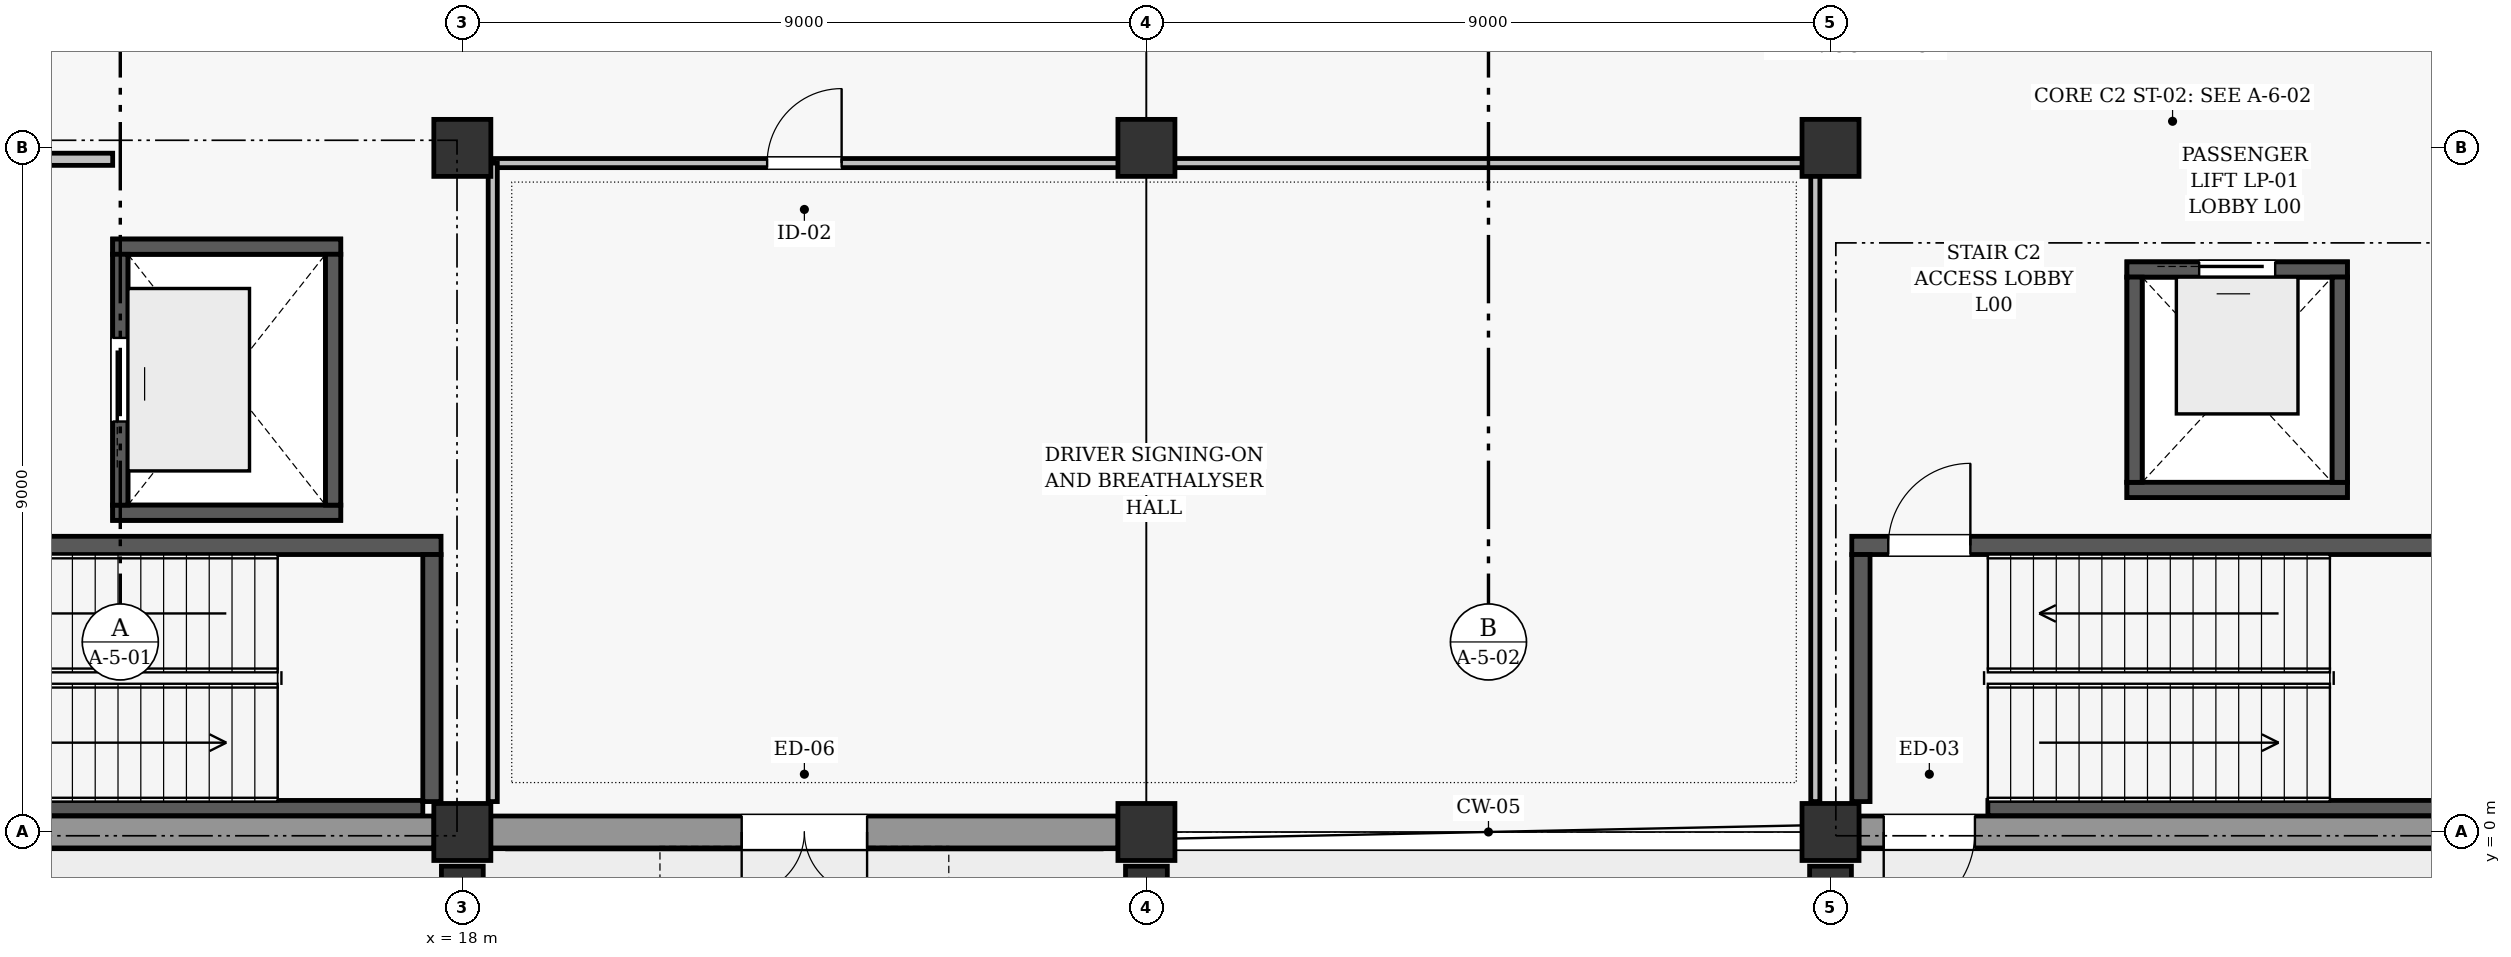
"""IFC4 building model, lengths in metres.
Left out: names, types, materials, properties, quantities, classifications, styles, units other than length and angle.
Written with IfcOpenShell. Run it as: python <this file> out.ifc"""

import sys

from ifc_helpers import new_model, si_unit, direction, frame, frame_2d, origin, origin_2d, place, context, subcontext, project, spatial, rectangle, extrude, element, fill, save


model = new_model("IFC4")
c1 = context("Model", 3, precision=1e-05, world=origin(), true_north=direction((0.0, 1.0)))
c2 = subcontext(c1, "Body", "Model", "MODEL_VIEW")
j1 = project(units=[si_unit("LENGTHUNIT", "METRE"), si_unit("PLANEANGLEUNIT", "RADIAN")], contexts=[c1])
p1 = place(None, origin())
s1 = spatial("IfcSite", under=j1, at=p1, CompositionType="ELEMENT")
p2 = place(p1, origin())
s2 = spatial("IfcBuilding", under=s1, at=p2, CompositionType="ELEMENT")
p3 = place(p2, origin())
s3 = spatial("IfcBuildingStorey", under=s2, at=p3, CompositionType="ELEMENT", Elevation=0.0)
for number, where, z_axis, x_axis in (
    (1, (18.0, 0.0, 0.0), (0.0, 0.0, 1.0), (1.0, 0.0, 0.0)),
    (2, (18.0, 9.0, 0.0), (0.0, 0.0, 1.0), (1.0, 0.0, 0.0)),
    (3, (27.0, 0.0, 0.0), (0.0, 0.0, 1.0), (1.0, 0.0, 0.0)),
    (4, (27.0, 9.0, 0.0), (0.0, 0.0, 1.0), (1.0, 0.0, 0.0)),
    (5, (36.0, 0.0, 0.0), (0.0, 0.0, 1.0), (1.0, 0.0, 0.0)),
    (6, (36.0, 9.0, 0.0), (0.0, 0.0, 1.0), (1.0, 0.0, 0.0)),
):
    element("IfcColumn", number, at=place(p3, frame(where, z_axis=z_axis, x_axis=x_axis)), inside=s3, PredefinedType="COLUMN", context=c2, shape_type="SweptSolid", body=[
        extrude(rectangle(XDim=0.75, YDim=0.75, at=origin_2d()), origin(), (0.0, 0.0, 1.0), 4.8),
    ])
for number, where, z_axis, x_axis in (
    (7, (18.0, -0.85, 0.0), (0.0, 0.0, 1.0), (1.0, 0.0, 0.0)),
    (8, (27.0, -0.85, 0.0), (0.0, 0.0, 1.0), (1.0, 0.0, 0.0)),
    (9, (36.0, -0.85, 0.0), (0.0, 0.0, 1.0), (1.0, 0.0, 0.0)),
):
    element("IfcColumn", number, at=place(p3, frame(where, z_axis=z_axis, x_axis=x_axis)), inside=s3, PredefinedType="PILASTER", context=c2, shape_type="SweptSolid", body=[
        extrude(rectangle(XDim=0.55, YDim=0.8, at=origin_2d()), origin(), (0.0, 0.0, 1.0), 4.8),
    ])
p4 = place(p3, frame((9.373, 0.0, 0.0), z_axis=(0.0, 0.0, 1.0), x_axis=(1.0, 0.0, 0.0)))
e10 = element("IfcWall", 10, at=p4, inside=s3, PredefinedType="SOLIDWALL", context=c2, shape_type="SweptSolid", body=[
    extrude(rectangle(XDim=8.254, YDim=0.42, at=frame_2d((4.127, 0.0))), origin(), (0.0, 0.0, 1.0), 3.842),
])
p5 = place(p4, frame((0.327, 0.0, 0.0)))
e11 = element("IfcOpeningElement", 11, at=p5, cuts=e10, PredefinedType="OPENING", context=c2, shape_type="SweptSolid", body=[
    extrude(rectangle(XDim=1.2, YDim=2.18, at=frame_2d((0.6, 1.09))), frame((0.0, 0.22, 0.0), z_axis=(0.0, -1.0, 0.0), x_axis=(1.0, 0.0, 0.0)), (0.0, 0.0, 1.0), 0.44),
])
p6 = place(p3, frame((18.373, 0.0, 0.0), z_axis=(0.0, 0.0, 1.0), x_axis=(1.0, 0.0, 0.0)))
e12 = element("IfcWall", 12, at=p6, inside=s3, PredefinedType="SOLIDWALL", context=c2, shape_type="SweptSolid", body=[
    extrude(rectangle(XDim=8.254, YDim=0.42, at=frame_2d((4.127, 0.0))), origin(), (0.0, 0.0, 1.0), 3.842),
])
p7 = place(p6, frame((3.302, 0.0, 0.0)))
e13 = element("IfcOpeningElement", 13, at=p7, cuts=e12, PredefinedType="OPENING", context=c2, shape_type="SweptSolid", body=[
    extrude(rectangle(XDim=1.65, YDim=2.28, at=frame_2d((0.825, 1.14))), frame((0.0, 0.22, 0.0), z_axis=(0.0, -1.0, 0.0), x_axis=(1.0, 0.0, 0.0)), (0.0, 0.0, 1.0), 0.44),
])
p8 = place(p3, frame((36.373, 0.0, 0.0), z_axis=(0.0, 0.0, 1.0), x_axis=(1.0, 0.0, 0.0)))
e14 = element("IfcWall", 14, at=p8, inside=s3, PredefinedType="SOLIDWALL", context=c2, shape_type="SweptSolid", body=[
    extrude(rectangle(XDim=8.254, YDim=0.42, at=frame_2d((4.127, 0.0))), origin(), (0.0, 0.0, 1.0), 3.842),
])
p9 = place(p8, frame((0.327, 0.0, 0.0)))
e15 = element("IfcOpeningElement", 15, at=p9, cuts=e14, PredefinedType="OPENING", context=c2, shape_type="SweptSolid", body=[
    extrude(rectangle(XDim=1.2, YDim=2.18, at=frame_2d((0.6, 1.09))), frame((0.0, 0.22, 0.0), z_axis=(0.0, -1.0, 0.0), x_axis=(1.0, 0.0, 0.0)), (0.0, 0.0, 1.0), 0.44),
])
p10 = place(p3, frame((11.07, 0.315, 0.0), z_axis=(0.0, 0.0, 1.0), x_axis=(1.0, 0.0, 0.0)))
e16 = element("IfcWall", 16, at=p10, inside=s3, PredefinedType="SHEAR", context=c2, shape_type="SweptSolid", body=[
    extrude(rectangle(XDim=6.41, YDim=0.2, at=frame_2d((3.205, 0.0))), origin(), (0.0, 0.0, 1.0), 4.55),
])
p11 = place(p3, frame((9.28, 3.77, 0.0), z_axis=(0.0, 0.0, 1.0), x_axis=(1.0, 0.0, 0.0)))
e17 = element("IfcWall", 17, at=p11, inside=s3, PredefinedType="SHEAR", context=c2, shape_type="SweptSolid", body=[
    extrude(rectangle(XDim=8.44, YDim=0.24, at=frame_2d((4.22, 0.0))), origin(), (0.0, 0.0, 1.0), 4.55),
])
p12 = place(p11, frame((0.48, 0.0, 0.0)))
e18 = element("IfcOpeningElement", 18, at=p12, cuts=e17, PredefinedType="OPENING", context=c2, shape_type="SweptSolid", body=[
    extrude(rectangle(XDim=1.08, YDim=2.08, at=frame_2d((0.54, 1.04))), frame((0.0, 0.13, 0.0), z_axis=(0.0, -1.0, 0.0), x_axis=(1.0, 0.0, 0.0)), (0.0, 0.0, 1.0), 0.26),
])
p13 = place(p3, frame((17.6, 0.4, 0.0), z_axis=(0.0, 0.0, 1.0), x_axis=(0.0, 1.0, 0.0)))
e19 = element("IfcWall", 19, at=p13, inside=s3, PredefinedType="SHEAR", context=c2, shape_type="SweptSolid", body=[
    extrude(rectangle(XDim=3.25, YDim=0.24, at=frame_2d((1.625, 0.0))), origin(), (0.0, 0.0, 1.0), 4.55),
])
p14 = place(p3, frame((38.07, 0.315, 0.0), z_axis=(0.0, 0.0, 1.0), x_axis=(1.0, 0.0, 0.0)))
e20 = element("IfcWall", 20, at=p14, inside=s3, PredefinedType="SHEAR", context=c2, shape_type="SweptSolid", body=[
    extrude(rectangle(XDim=6.41, YDim=0.2, at=frame_2d((3.205, 0.0))), origin(), (0.0, 0.0, 1.0), 4.55),
])
p15 = place(p3, frame((36.28, 3.77, 0.0), z_axis=(0.0, 0.0, 1.0), x_axis=(1.0, 0.0, 0.0)))
e21 = element("IfcWall", 21, at=p15, inside=s3, PredefinedType="SHEAR", context=c2, shape_type="SweptSolid", body=[
    extrude(rectangle(XDim=8.44, YDim=0.24, at=frame_2d((4.22, 0.0))), origin(), (0.0, 0.0, 1.0), 4.55),
])
p16 = place(p15, frame((0.48, 0.0, 0.0)))
e22 = element("IfcOpeningElement", 22, at=p16, cuts=e21, PredefinedType="OPENING", context=c2, shape_type="SweptSolid", body=[
    extrude(rectangle(XDim=1.08, YDim=2.08, at=frame_2d((0.54, 1.04))), frame((0.0, 0.13, 0.0), z_axis=(0.0, -1.0, 0.0), x_axis=(1.0, 0.0, 0.0)), (0.0, 0.0, 1.0), 0.26),
])
p17 = place(p3, frame((36.4, 0.4, 0.0), z_axis=(0.0, 0.0, 1.0), x_axis=(0.0, 1.0, 0.0)))
e23 = element("IfcWall", 23, at=p17, inside=s3, PredefinedType="SHEAR", context=c2, shape_type="SweptSolid", body=[
    extrude(rectangle(XDim=3.25, YDim=0.24, at=frame_2d((1.625, 0.0))), origin(), (0.0, 0.0, 1.0), 4.55),
])
for number, where, z_axis, x_axis in (
    (24, (13.4, 4.2, -1.4), (0.0, 0.0, 1.0), (1.0, 0.0, 0.0)),
    (25, (13.4, 7.7, -1.4), (0.0, 0.0, 1.0), (1.0, 0.0, 0.0)),
):
    element("IfcWall", number, at=place(p3, frame(where, z_axis=z_axis, x_axis=x_axis)), inside=s3, PredefinedType="SHEAR", context=c2, shape_type="SweptSolid", body=[
        extrude(rectangle(XDim=3.0, YDim=0.2, at=frame_2d((1.5, 0.0))), origin(), (0.0, 0.0, 1.0), 1.1),
    ])
for number, where, z_axis, x_axis in (
    (26, (13.5, 4.3, -1.4), (0.0, 0.0, 1.0), (0.0, 1.0, 0.0)),
    (27, (16.3, 4.3, -1.4), (0.0, 0.0, 1.0), (0.0, 1.0, 0.0)),
):
    element("IfcWall", number, at=place(p3, frame(where, z_axis=z_axis, x_axis=x_axis)), inside=s3, PredefinedType="SHEAR", context=c2, shape_type="SweptSolid", body=[
        extrude(rectangle(XDim=3.3, YDim=0.2, at=frame_2d((1.65, 0.0))), origin(), (0.0, 0.0, 1.0), 1.1),
    ])
for number, where, z_axis, x_axis in (
    (28, (13.4, 4.2, 0.0), (0.0, 0.0, 1.0), (1.0, 0.0, 0.0)),
    (29, (13.4, 7.7, 0.0), (0.0, 0.0, 1.0), (1.0, 0.0, 0.0)),
):
    element("IfcWall", number, at=place(p3, frame(where, z_axis=z_axis, x_axis=x_axis)), inside=s3, PredefinedType="SHEAR", context=c2, shape_type="SweptSolid", body=[
        extrude(rectangle(XDim=3.0, YDim=0.2, at=frame_2d((1.5, 0.0))), origin(), (0.0, 0.0, 1.0), 4.55),
    ])
p18 = place(p3, frame((13.5, 4.3, 0.0), z_axis=(0.0, 0.0, 1.0), x_axis=(0.0, 1.0, 0.0)))
e30 = element("IfcWall", 30, at=p18, inside=s3, PredefinedType="SHEAR", context=c2, shape_type="SweptSolid", body=[
    extrude(rectangle(XDim=3.3, YDim=0.2, at=frame_2d((1.65, 0.0))), origin(), (0.0, 0.0, 1.0), 4.55),
])
p19 = place(p18, frame((1.1, 0.0, 0.0)))
e31 = element("IfcOpeningElement", 31, at=p19, cuts=e30, PredefinedType="OPENING", context=c2, shape_type="SweptSolid", body=[
    extrude(rectangle(XDim=1.1, YDim=2.1, at=frame_2d((0.55, 1.05))), frame((0.0, 0.11, 0.0), z_axis=(0.0, -1.0, 0.0), x_axis=(1.0, 0.0, 0.0)), (0.0, 0.0, 1.0), 0.22),
])
p20 = place(p3, frame((16.3, 4.3, 0.0), z_axis=(0.0, 0.0, 1.0), x_axis=(0.0, 1.0, 0.0)))
e32 = element("IfcWall", 32, at=p20, inside=s3, PredefinedType="SHEAR", context=c2, shape_type="SweptSolid", body=[
    extrude(rectangle(XDim=3.3, YDim=0.2, at=frame_2d((1.65, 0.0))), origin(), (0.0, 0.0, 1.0), 4.55),
])
for number, where, z_axis, x_axis in (
    (33, (39.9, 4.5, -1.4), (0.0, 0.0, 1.0), (1.0, 0.0, 0.0)),
    (34, (39.9, 7.4, -1.4), (0.0, 0.0, 1.0), (1.0, 0.0, 0.0)),
):
    element("IfcWall", number, at=place(p3, frame(where, z_axis=z_axis, x_axis=x_axis)), inside=s3, PredefinedType="SHEAR", context=c2, shape_type="SweptSolid", body=[
        extrude(rectangle(XDim=2.9, YDim=0.2, at=frame_2d((1.45, 0.0))), origin(), (0.0, 0.0, 1.0), 1.1),
    ])
for number, where, z_axis, x_axis in (
    (35, (40.0, 4.6, -1.4), (0.0, 0.0, 1.0), (0.0, 1.0, 0.0)),
    (36, (42.7, 4.6, -1.4), (0.0, 0.0, 1.0), (0.0, 1.0, 0.0)),
):
    element("IfcWall", number, at=place(p3, frame(where, z_axis=z_axis, x_axis=x_axis)), inside=s3, PredefinedType="SHEAR", context=c2, shape_type="SweptSolid", body=[
        extrude(rectangle(XDim=2.7, YDim=0.2, at=frame_2d((1.35, 0.0))), origin(), (0.0, 0.0, 1.0), 1.1),
    ])
p21 = place(p3, frame((39.9, 4.5, 0.0), z_axis=(0.0, 0.0, 1.0), x_axis=(1.0, 0.0, 0.0)))
e37 = element("IfcWall", 37, at=p21, inside=s3, PredefinedType="SHEAR", context=c2, shape_type="SweptSolid", body=[
    extrude(rectangle(XDim=2.9, YDim=0.2, at=frame_2d((1.45, 0.0))), origin(), (0.0, 0.0, 1.0), 4.55),
])
p22 = place(p3, frame((39.9, 7.4, 0.0), z_axis=(0.0, 0.0, 1.0), x_axis=(1.0, 0.0, 0.0)))
e38 = element("IfcWall", 38, at=p22, inside=s3, PredefinedType="SHEAR", context=c2, shape_type="SweptSolid", body=[
    extrude(rectangle(XDim=2.9, YDim=0.2, at=frame_2d((1.45, 0.0))), origin(), (0.0, 0.0, 1.0), 4.55),
])
p23 = place(p22, frame((0.95, 0.0, 0.0)))
e39 = element("IfcOpeningElement", 39, at=p23, cuts=e38, PredefinedType="OPENING", context=c2, shape_type="SweptSolid", body=[
    extrude(rectangle(XDim=1.0, YDim=2.1, at=frame_2d((0.5, 1.05))), frame((0.0, 0.11, 0.0), z_axis=(0.0, -1.0, 0.0), x_axis=(1.0, 0.0, 0.0)), (0.0, 0.0, 1.0), 0.22),
])
for number, where, z_axis, x_axis in (
    (40, (40.0, 4.6, 0.0), (0.0, 0.0, 1.0), (0.0, 1.0, 0.0)),
    (41, (42.7, 4.6, 0.0), (0.0, 0.0, 1.0), (0.0, 1.0, 0.0)),
):
    element("IfcWall", number, at=place(p3, frame(where, z_axis=z_axis, x_axis=x_axis)), inside=s3, PredefinedType="SHEAR", context=c2, shape_type="SweptSolid", body=[
        extrude(rectangle(XDim=2.7, YDim=0.2, at=frame_2d((1.35, 0.0))), origin(), (0.0, 0.0, 1.0), 4.55),
    ])
p24 = place(p3, frame((9.52, 8.85, 0.0), z_axis=(0.0, 0.0, 1.0), x_axis=(1.0, 0.0, 0.0)))
e42 = element("IfcWall", 42, at=p24, inside=s3, PredefinedType="PARTITIONING", context=c2, shape_type="SweptSolid", body=[
    extrude(rectangle(XDim=3.88, YDim=0.16, at=frame_2d((1.94, 0.0))), origin(), (0.0, 0.0, 1.0), 3.795),
])
p25 = place(p24, frame((1.32, 0.0, 0.0)))
e43 = element("IfcOpeningElement", 43, at=p25, cuts=e42, PredefinedType="OPENING", context=c2, shape_type="SweptSolid", body=[
    extrude(rectangle(XDim=1.22, YDim=2.12, at=frame_2d((0.61, 1.06))), frame((0.0, 0.09, 0.0), z_axis=(0.0, -1.0, 0.0), x_axis=(1.0, 0.0, 0.0)), (0.0, 0.0, 1.0), 0.18),
])
p26 = place(p3, frame((18.4, 8.8, 0.0), z_axis=(0.0, 0.0, 1.0), x_axis=(1.0, 0.0, 0.0)))
e44 = element("IfcWall", 44, at=p26, inside=s3, PredefinedType="PARTITIONING", context=c2, shape_type="SweptSolid", body=[
    extrude(rectangle(XDim=17.4, YDim=0.12, at=frame_2d((8.7, 0.0))), origin(), (0.0, 0.0, 1.0), 3.795),
])
p27 = place(p26, frame((3.61, 0.0, 0.0)))
e45 = element("IfcOpeningElement", 45, at=p27, cuts=e44, PredefinedType="OPENING", context=c2, shape_type="SweptSolid", body=[
    extrude(rectangle(XDim=0.98, YDim=2.08, at=frame_2d((0.49, 1.04))), frame((0.0, 0.07, 0.0), z_axis=(0.0, -1.0, 0.0), x_axis=(1.0, 0.0, 0.0)), (0.0, 0.0, 1.0), 0.14),
])
p28 = place(p3, frame((18.4, 0.4, 0.0), z_axis=(0.0, 0.0, 1.0), x_axis=(0.0, 1.0, 0.0)))
e46 = element("IfcWall", 46, at=p28, inside=s3, PredefinedType="PARTITIONING", context=c2, shape_type="SweptSolid", body=[
    extrude(rectangle(XDim=8.4, YDim=0.12, at=frame_2d((4.2, 0.0))), origin(), (0.0, 0.0, 1.0), 3.795),
])
p29 = place(p3, frame((35.8, 0.4, 0.0), z_axis=(0.0, 0.0, 1.0), x_axis=(0.0, 1.0, 0.0)))
e47 = element("IfcWall", 47, at=p29, inside=s3, PredefinedType="PARTITIONING", context=c2, shape_type="SweptSolid", body=[
    extrude(rectangle(XDim=8.4, YDim=0.12, at=frame_2d((4.2, 0.0))), origin(), (0.0, 0.0, 1.0), 3.895),
])
p30 = place(p7, frame((1.65, 0.0, 0.0), z_axis=(0.0, 0.0, 1.0), x_axis=(-1.0, 0.0, 0.0)))
e48 = element("IfcDoor", 48, at=p30, inside=s3, OperationType="DOUBLE_SWING_LEFT", PredefinedType="DOOR", context=c2, shape_type="SweptSolid", body=[
    extrude(rectangle(XDim=1.65, YDim=2.28, at=frame_2d((0.825, 1.14))), frame((0.0, 0.025, 0.0), z_axis=(0.0, -1.0, 0.0), x_axis=(1.0, 0.0, 0.0)), (0.0, 0.0, 1.0), 0.05),
])
fill(e13, e48)
p31 = place(p9, frame((1.2, 0.0, 0.0), z_axis=(0.0, 0.0, 1.0), x_axis=(-1.0, 0.0, 0.0)))
e49 = element("IfcDoor", 49, at=p31, inside=s3, OperationType="SINGLE_SWING_LEFT", PredefinedType="DOOR", context=c2, shape_type="SweptSolid", body=[
    extrude(rectangle(XDim=1.2, YDim=2.18, at=frame_2d((0.6, 1.09))), frame((0.0, 0.025, 0.0), z_axis=(0.0, -1.0, 0.0), x_axis=(1.0, 0.0, 0.0)), (0.0, 0.0, 1.0), 0.05),
])
fill(e15, e49)
p32 = place(p16, origin())
e50 = element("IfcDoor", 50, at=p32, inside=s3, OperationType="SINGLE_SWING_RIGHT", PredefinedType="DOOR", context=c2, shape_type="SweptSolid", body=[
    extrude(rectangle(XDim=1.08, YDim=2.08, at=frame_2d((0.54, 1.04))), frame((0.0, 0.025, 0.0), z_axis=(0.0, -1.0, 0.0), x_axis=(1.0, 0.0, 0.0)), (0.0, 0.0, 1.0), 0.05),
])
fill(e22, e50)
p33 = place(p19, origin())
e51 = element("IfcDoor", 51, at=p33, inside=s3, OperationType="SLIDING_TO_LEFT", PredefinedType="DOOR", context=c2, shape_type="SweptSolid", body=[
    extrude(rectangle(XDim=1.1, YDim=2.1, at=frame_2d((0.55, 1.05))), frame((0.0, 0.025, 0.0), z_axis=(0.0, -1.0, 0.0), x_axis=(1.0, 0.0, 0.0)), (0.0, 0.0, 1.0), 0.05),
])
fill(e31, e51)
p34 = place(p23, origin())
e52 = element("IfcDoor", 52, at=p34, inside=s3, OperationType="SLIDING_TO_LEFT", PredefinedType="DOOR", context=c2, shape_type="SweptSolid", body=[
    extrude(rectangle(XDim=1.0, YDim=2.1, at=frame_2d((0.5, 1.05))), frame((0.0, 0.025, 0.0), z_axis=(0.0, -1.0, 0.0), x_axis=(1.0, 0.0, 0.0)), (0.0, 0.0, 1.0), 0.05),
])
fill(e39, e52)
p35 = place(p27, origin())
e53 = element("IfcDoor", 53, at=p35, inside=s3, OperationType="SINGLE_SWING_RIGHT", PredefinedType="DOOR", context=c2, shape_type="SweptSolid", body=[
    extrude(rectangle(XDim=0.98, YDim=2.08, at=frame_2d((0.49, 1.04))), frame((0.0, 0.025, 0.0), z_axis=(0.0, -1.0, 0.0), x_axis=(1.0, 0.0, 0.0)), (0.0, 0.0, 1.0), 0.05),
])
fill(e45, e53)
save(model, sys.argv[1])
